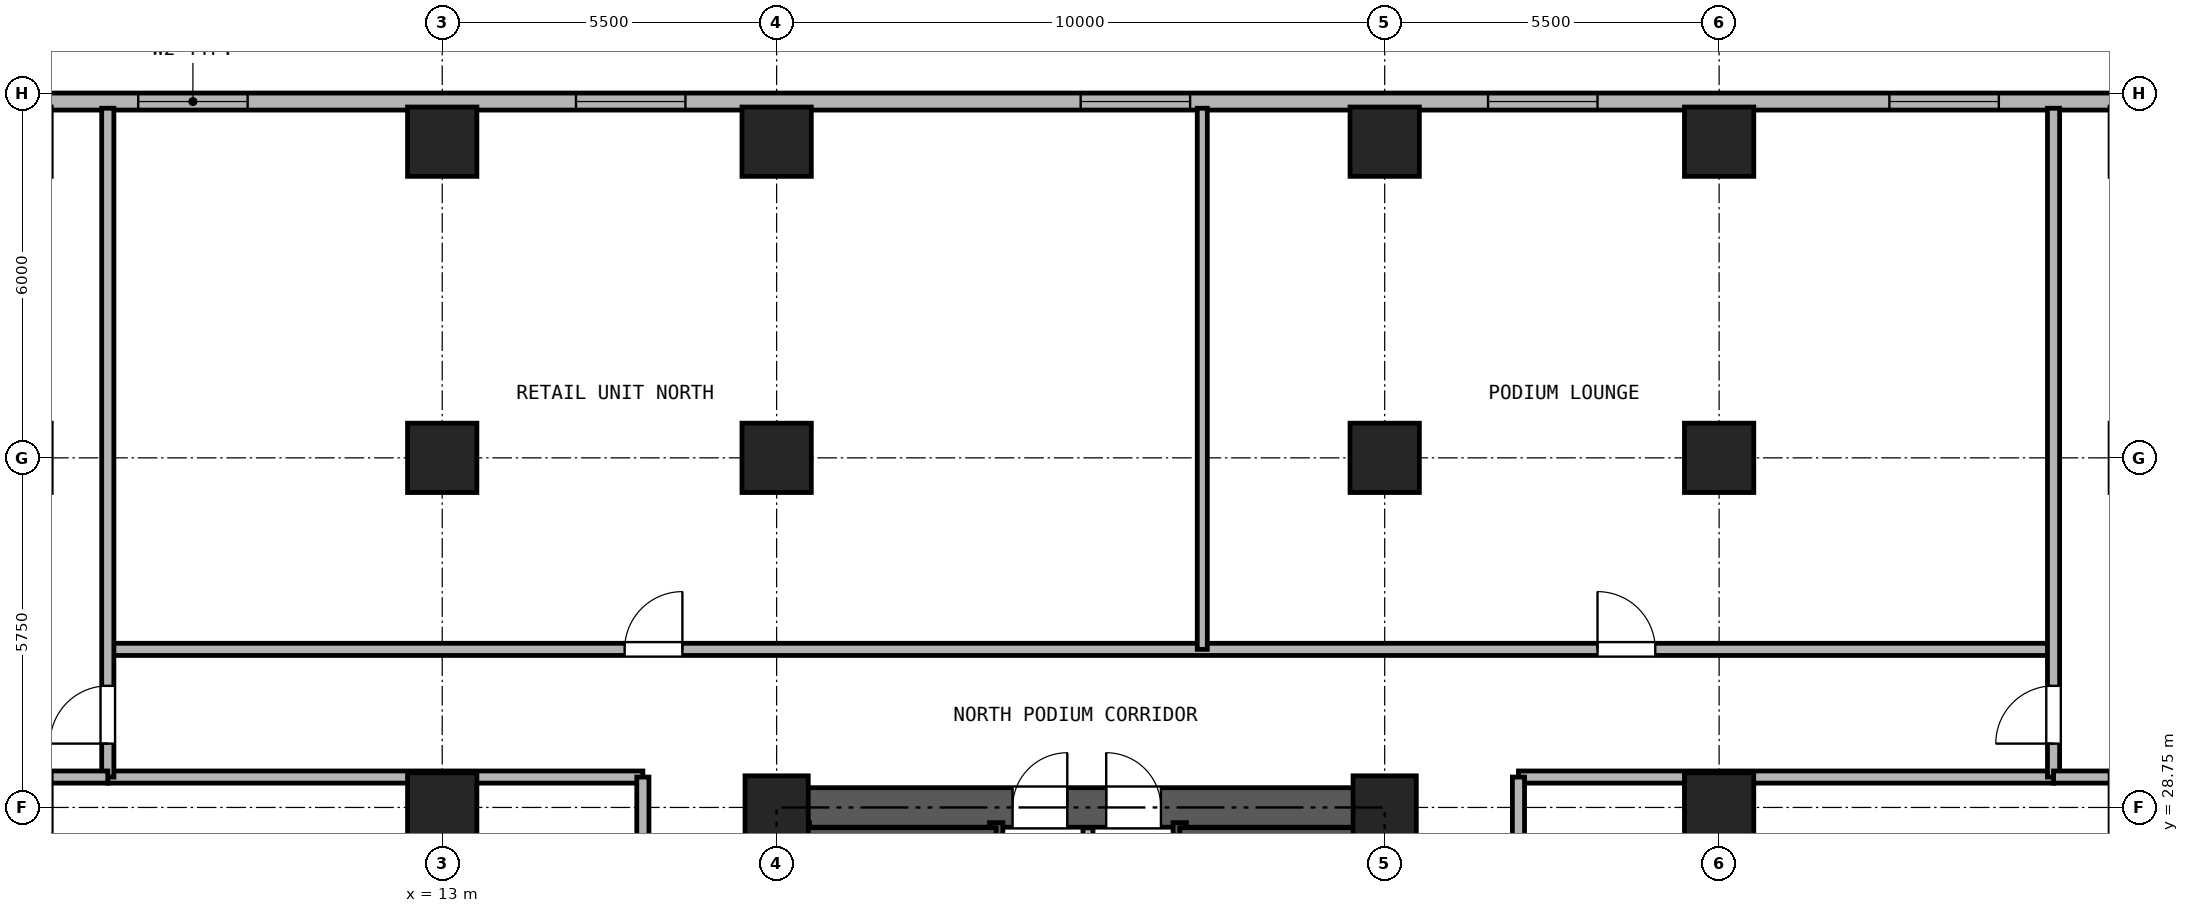
"""IFC4 building model, lengths in metres.
Left out: names, types, materials, properties, quantities, classifications, styles, units other than length and angle.
Written with IfcOpenShell. Run it as: python <this file> out.ifc"""

import sys

from ifc_helpers import new_model, si_unit, direction, frame, frame_2d, origin, origin_2d, place, context, subcontext, project, spatial, rectangle, hollow_rectangle, extrude, source, transform, mapped, element, fill, save


model = new_model("IFC4")
c1 = context("Model", 3, precision=1e-05, world=origin(), true_north=direction((0.0, 1.0)))
c2 = subcontext(c1, "Body", "Model", "MODEL_VIEW")
j1 = project(units=[si_unit("LENGTHUNIT", "METRE"), si_unit("PLANEANGLEUNIT", "RADIAN")], contexts=[c1])
p1 = place(None, origin())
s1 = spatial("IfcSite", under=j1, at=p1, CompositionType="ELEMENT")
p2 = place(p1, origin())
s2 = spatial("IfcBuilding", under=s1, at=p2, CompositionType="ELEMENT")
p3 = place(p2, frame((0.0, 0.0, 4.5)))
s3 = spatial("IfcBuildingStorey", under=s2, at=p3, CompositionType="ELEMENT", Elevation=4.5)
m1 = source(origin(), c2, "Body", "SweptSolid", [
    extrude(hollow_rectangle(XDim=1.14, YDim=1.14, WallThickness=0.07, at=origin_2d()), origin(), (0.0, 0.0, 1.0), 4.18),
])
for number, where, z_axis, x_axis in (
    (1, (13.0, 39.7, 0.0), (0.0, 0.0, 1.0), (1.0, 0.0, 0.0)),
    (2, (18.5, 39.7, 0.0), (0.0, 0.0, 1.0), (1.0, 0.0, 0.0)),
    (3, (28.5, 39.7, 0.0), (0.0, 0.0, 1.0), (1.0, 0.0, 0.0)),
    (4, (34.0, 39.7, 0.0), (0.0, 0.0, 1.0), (1.0, 0.0, 0.0)),
    (5, (13.0, 28.75, 0.0), (0.0, 0.0, 1.0), (1.0, 0.0, 0.0)),
    (6, (13.0, 34.5, 0.0), (0.0, 0.0, 1.0), (1.0, 0.0, 0.0)),
):
    element("IfcColumn", number, at=place(p3, frame(where, z_axis=z_axis, x_axis=x_axis)), inside=s3, PredefinedType="COLUMN", context=c2, shape_type="MappedRepresentation", body=[
        mapped(m1, transform((0.0, 0.0, 0.0), x_axis=(1.0, 0.0, 0.0), y_axis=(0.0, 1.0, 0.0), z_axis=(0.0, 0.0, 1.0), scale=1.0)),
    ])
m2 = source(origin(), c2, "Body", "SweptSolid", [
    extrude(hollow_rectangle(XDim=1.04, YDim=1.04, WallThickness=0.065, at=origin_2d()), origin(), (0.0, 0.0, 1.0), 4.18),
])
p4 = place(p3, frame((18.5, 28.75, 0.0), z_axis=(0.0, 0.0, 1.0), x_axis=(1.0, 0.0, 0.0)))
e7 = element("IfcColumn", 7, at=p4, inside=s3, PredefinedType="COLUMN", context=c2, shape_type="MappedRepresentation", body=[
    mapped(m2, transform((0.0, 0.0, 0.0), x_axis=(1.0, 0.0, 0.0), y_axis=(0.0, 1.0, 0.0), z_axis=(0.0, 0.0, 1.0), scale=1.0)),
])
p5 = place(p3, frame((18.5, 34.5, 0.0), z_axis=(0.0, 0.0, 1.0), x_axis=(1.0, 0.0, 0.0)))
e8 = element("IfcColumn", 8, at=p5, inside=s3, PredefinedType="COLUMN", context=c2, shape_type="MappedRepresentation", body=[
    mapped(m1, transform((0.0, 0.0, 0.0), x_axis=(1.0, 0.0, 0.0), y_axis=(0.0, 1.0, 0.0), z_axis=(0.0, 0.0, 1.0), scale=1.0)),
])
p6 = place(p3, frame((28.5, 28.75, 0.0), z_axis=(0.0, 0.0, 1.0), x_axis=(1.0, 0.0, 0.0)))
e9 = element("IfcColumn", 9, at=p6, inside=s3, PredefinedType="COLUMN", context=c2, shape_type="MappedRepresentation", body=[
    mapped(m2, transform((0.0, 0.0, 0.0), x_axis=(1.0, 0.0, 0.0), y_axis=(0.0, 1.0, 0.0), z_axis=(0.0, 0.0, 1.0), scale=1.0)),
])
for number, where, z_axis, x_axis in (
    (10, (28.5, 34.5, 0.0), (0.0, 0.0, 1.0), (1.0, 0.0, 0.0)),
    (11, (34.0, 28.75, 0.0), (0.0, 0.0, 1.0), (1.0, 0.0, 0.0)),
    (12, (34.0, 34.5, 0.0), (0.0, 0.0, 1.0), (1.0, 0.0, 0.0)),
):
    element("IfcColumn", number, at=place(p3, frame(where, z_axis=z_axis, x_axis=x_axis)), inside=s3, PredefinedType="COLUMN", context=c2, shape_type="MappedRepresentation", body=[
        mapped(m1, transform((0.0, 0.0, 0.0), x_axis=(1.0, 0.0, 0.0), y_axis=(0.0, 1.0, 0.0), z_axis=(0.0, 0.0, 1.0), scale=1.0)),
    ])
p7 = place(p3, frame((4.0, 40.36, 0.0), z_axis=(0.0, 0.0, 1.0), x_axis=(1.0, 0.0, 0.0)))
e13 = element("IfcWall", 13, at=p7, inside=s3, PredefinedType="SOLIDWALL", context=c2, shape_type="SweptSolid", body=[
    extrude(rectangle(XDim=39.0, YDim=0.28, at=frame_2d((19.5, 0.0))), origin(), (0.0, 0.0, 1.0), 4.18),
])
p8 = place(p7, frame((4.0, 0.0, 0.9)))
e14 = element("IfcOpeningElement", 14, at=p8, cuts=e13, PredefinedType="OPENING", context=c2, shape_type="SweptSolid", body=[
    extrude(rectangle(XDim=1.8, YDim=2.1, at=frame_2d((0.9, 1.05))), frame((0.0, 0.15, 0.0), z_axis=(0.0, -1.0, 0.0), x_axis=(1.0, 0.0, 0.0)), (0.0, 0.0, 1.0), 0.3),
])
p9 = place(p7, frame((11.2, 0.0, 0.9)))
e15 = element("IfcOpeningElement", 15, at=p9, cuts=e13, PredefinedType="OPENING", context=c2, shape_type="SweptSolid", body=[
    extrude(rectangle(XDim=1.8, YDim=2.1, at=frame_2d((0.9, 1.05))), frame((0.0, 0.15, 0.0), z_axis=(0.0, -1.0, 0.0), x_axis=(1.0, 0.0, 0.0)), (0.0, 0.0, 1.0), 0.3),
])
p10 = place(p7, frame((19.5, 0.0, 0.9)))
e16 = element("IfcOpeningElement", 16, at=p10, cuts=e13, PredefinedType="OPENING", context=c2, shape_type="SweptSolid", body=[
    extrude(rectangle(XDim=1.8, YDim=2.1, at=frame_2d((0.9, 1.05))), frame((0.0, 0.15, 0.0), z_axis=(0.0, -1.0, 0.0), x_axis=(1.0, 0.0, 0.0)), (0.0, 0.0, 1.0), 0.3),
])
p11 = place(p7, frame((26.2, 0.0, 0.9)))
e17 = element("IfcOpeningElement", 17, at=p11, cuts=e13, PredefinedType="OPENING", context=c2, shape_type="SweptSolid", body=[
    extrude(rectangle(XDim=1.8, YDim=2.1, at=frame_2d((0.9, 1.05))), frame((0.0, 0.15, 0.0), z_axis=(0.0, -1.0, 0.0), x_axis=(1.0, 0.0, 0.0)), (0.0, 0.0, 1.0), 0.3),
])
p12 = place(p7, frame((32.8, 0.0, 0.9)))
e18 = element("IfcOpeningElement", 18, at=p12, cuts=e13, PredefinedType="OPENING", context=c2, shape_type="SweptSolid", body=[
    extrude(rectangle(XDim=1.8, YDim=2.1, at=frame_2d((0.9, 1.05))), frame((0.0, 0.15, 0.0), z_axis=(0.0, -1.0, 0.0), x_axis=(1.0, 0.0, 0.0)), (0.0, 0.0, 1.0), 0.3),
])
p13 = place(p3, frame((18.175, 28.75, 0.0), z_axis=(0.0, 0.0, 1.0), x_axis=(1.0, 0.0, 0.0)))
e19 = element("IfcWall", 19, at=p13, inside=s3, PredefinedType="SHEAR", context=c2, shape_type="SweptSolid", body=[
    extrude(rectangle(XDim=10.65, YDim=0.65, at=frame_2d((5.325, 0.0))), origin(), (0.0, 0.0, 1.0), 4.18),
])
p14 = place(p13, frame((4.205, 0.0, 0.0)))
e20 = element("IfcOpeningElement", 20, at=p14, cuts=e19, PredefinedType="OPENING", context=c2, shape_type="SweptSolid", body=[
    extrude(rectangle(XDim=0.9, YDim=2.05, at=frame_2d((0.45, 1.025))), frame((0.0, 0.335, 0.0), z_axis=(0.0, -1.0, 0.0), x_axis=(1.0, 0.0, 0.0)), (0.0, 0.0, 1.0), 0.67),
])
p15 = place(p13, frame((5.745, 0.0, 0.0)))
e21 = element("IfcOpeningElement", 21, at=p15, cuts=e19, PredefinedType="OPENING", context=c2, shape_type="SweptSolid", body=[
    extrude(rectangle(XDim=0.9, YDim=2.05, at=frame_2d((0.45, 1.025))), frame((0.0, 0.335, 0.0), z_axis=(0.0, -1.0, 0.0), x_axis=(1.0, 0.0, 0.0)), (0.0, 0.0, 1.0), 0.67),
])
p16 = place(p3, frame((18.5, 11.825, 0.0), z_axis=(0.0, 0.0, 1.0), x_axis=(0.0, 1.0, 0.0)))
e22 = element("IfcWall", 22, at=p16, inside=s3, PredefinedType="SHEAR", context=c2, shape_type="SweptSolid", body=[
    extrude(rectangle(XDim=16.6, YDim=0.65, at=frame_2d((8.3, 0.0))), origin(), (0.0, 0.0, 1.0), 4.18),
])
p17 = place(p16, frame((7.325, 0.0, 0.0)))
e23 = element("IfcOpeningElement", 23, at=p17, cuts=e22, PredefinedType="OPENING", context=c2, shape_type="SweptSolid", body=[
    extrude(rectangle(XDim=1.15, YDim=2.2, at=frame_2d((0.575, 1.1))), frame((0.0, 0.335, 0.0), z_axis=(0.0, -1.0, 0.0), x_axis=(1.0, 0.0, 0.0)), (0.0, 0.0, 1.0), 0.67),
])
p18 = place(p3, frame((28.5, 11.825, 0.0), z_axis=(0.0, 0.0, 1.0), x_axis=(0.0, 1.0, 0.0)))
e24 = element("IfcWall", 24, at=p18, inside=s3, PredefinedType="SHEAR", context=c2, shape_type="SweptSolid", body=[
    extrude(rectangle(XDim=16.6, YDim=0.65, at=frame_2d((8.3, 0.0))), origin(), (0.0, 0.0, 1.0), 4.18),
])
p19 = place(p18, frame((7.325, 0.0, 0.0)))
e25 = element("IfcOpeningElement", 25, at=p19, cuts=e24, PredefinedType="OPENING", context=c2, shape_type="SweptSolid", body=[
    extrude(rectangle(XDim=1.15, YDim=2.2, at=frame_2d((0.575, 1.1))), frame((0.0, 0.335, 0.0), z_axis=(0.0, -1.0, 0.0), x_axis=(1.0, 0.0, 0.0)), (0.0, 0.0, 1.0), 0.67),
])
for number, where, z_axis, x_axis in (
    (26, (18.93, 21.39, 0.0), (0.0, 0.0, 1.0), (0.0, 1.0, 0.0)),
    (27, (22.11, 21.39, 0.0), (0.0, 0.0, 1.0), (0.0, 1.0, 0.0)),
    (28, (25.13, 21.39, 0.0), (0.0, 0.0, 1.0), (0.0, 1.0, 0.0)),
):
    element("IfcWall", number, at=place(p3, frame(where, z_axis=z_axis, x_axis=x_axis)), inside=s3, PredefinedType="SOLIDWALL", context=c2, shape_type="SweptSolid", body=[
        extrude(rectangle(XDim=7.11, YDim=0.22, at=frame_2d((3.555, 0.0))), origin(), (0.0, 0.0, 1.0), 4.18),
    ])
p20 = place(p3, frame((18.835, 28.335, 0.0), z_axis=(0.0, 0.0, 1.0), x_axis=(1.0, 0.0, 0.0)))
e29 = element("IfcWall", 29, at=p20, inside=s3, PredefinedType="PARTITIONING", context=c2, shape_type="SweptSolid", body=[
    extrude(rectangle(XDim=3.275, YDim=0.165, at=frame_2d((1.638, 0.0))), origin(), (0.0, 0.0, 1.0), 4.18),
])
p21 = place(p3, frame((25.13, 28.335, 0.0), z_axis=(0.0, 0.0, 1.0), x_axis=(1.0, 0.0, 0.0)))
e30 = element("IfcWall", 30, at=p21, inside=s3, PredefinedType="PARTITIONING", context=c2, shape_type="SweptSolid", body=[
    extrude(rectangle(XDim=3.035, YDim=0.165, at=frame_2d((1.518, 0.0))), origin(), (0.0, 0.0, 1.0), 4.18),
])
p22 = place(p3, frame((23.62, 24.4, 0.0), z_axis=(0.0, 0.0, 1.0), x_axis=(0.0, 1.0, 0.0)))
e31 = element("IfcWall", 31, at=p22, inside=s3, PredefinedType="PARTITIONING", context=c2, shape_type="SweptSolid", body=[
    extrude(rectangle(XDim=4.015, YDim=0.165, at=frame_2d((2.008, 0.0))), origin(), (0.0, 0.0, 1.0), 4.18),
])
p23 = place(p3, frame((7.5, 31.35, 0.0), z_axis=(0.0, 0.0, 1.0), x_axis=(1.0, 0.0, 0.0)))
e32 = element("IfcWall", 32, at=p23, inside=s3, PredefinedType="PARTITIONING", context=c2, shape_type="SweptSolid", body=[
    extrude(rectangle(XDim=32.0, YDim=0.2, at=frame_2d((16.0, 0.0))), origin(), (0.0, 0.0, 1.0), 4.18),
])
p24 = place(p23, frame((8.5, 0.0, 0.0)))
e33 = element("IfcOpeningElement", 33, at=p24, cuts=e32, PredefinedType="OPENING", context=c2, shape_type="SweptSolid", body=[
    extrude(rectangle(XDim=0.95, YDim=2.15, at=frame_2d((0.475, 1.075))), frame((0.0, 0.11, 0.0), z_axis=(0.0, -1.0, 0.0), x_axis=(1.0, 0.0, 0.0)), (0.0, 0.0, 1.0), 0.22),
])
p25 = place(p23, frame((24.5, 0.0, 0.0)))
e34 = element("IfcOpeningElement", 34, at=p25, cuts=e32, PredefinedType="OPENING", context=c2, shape_type="SweptSolid", body=[
    extrude(rectangle(XDim=0.95, YDim=2.15, at=frame_2d((0.475, 1.075))), frame((0.0, 0.11, 0.0), z_axis=(0.0, -1.0, 0.0), x_axis=(1.0, 0.0, 0.0)), (0.0, 0.0, 1.0), 0.22),
])
for number, where, z_axis, x_axis in (
    (35, (7.5, 29.25, 0.0), (0.0, 0.0, 1.0), (1.0, 0.0, 0.0)),
    (36, (30.7, 29.25, 0.0), (0.0, 0.0, 1.0), (1.0, 0.0, 0.0)),
):
    element("IfcWall", number, at=place(p3, frame(where, z_axis=z_axis, x_axis=x_axis)), inside=s3, PredefinedType="PARTITIONING", context=c2, shape_type="SweptSolid", body=[
        extrude(rectangle(XDim=8.8, YDim=0.2, at=frame_2d((4.4, 0.0))), origin(), (0.0, 0.0, 1.0), 4.18),
    ])
p26 = place(p3, frame((16.3, 11.0, 0.0), z_axis=(0.0, 0.0, 1.0), x_axis=(0.0, 1.0, 0.0)))
e37 = element("IfcWall", 37, at=p26, inside=s3, PredefinedType="PARTITIONING", context=c2, shape_type="SweptSolid", body=[
    extrude(rectangle(XDim=18.25, YDim=0.2, at=frame_2d((9.125, 0.0))), origin(), (0.0, 0.0, 1.0), 4.18),
])
p27 = place(p26, frame((4.25, 0.0, 0.0)))
e38 = element("IfcOpeningElement", 38, at=p27, cuts=e37, PredefinedType="OPENING", context=c2, shape_type="SweptSolid", body=[
    extrude(rectangle(XDim=0.95, YDim=2.15, at=frame_2d((0.475, 1.075))), frame((0.0, 0.11, 0.0), z_axis=(0.0, -1.0, 0.0), x_axis=(1.0, 0.0, 0.0)), (0.0, 0.0, 1.0), 0.22),
])
p28 = place(p26, frame((13.375, 0.0, 0.0)))
e39 = element("IfcOpeningElement", 39, at=p28, cuts=e37, PredefinedType="OPENING", context=c2, shape_type="SweptSolid", body=[
    extrude(rectangle(XDim=0.95, YDim=2.15, at=frame_2d((0.475, 1.075))), frame((0.0, 0.11, 0.0), z_axis=(0.0, -1.0, 0.0), x_axis=(1.0, 0.0, 0.0)), (0.0, 0.0, 1.0), 0.22),
])
p29 = place(p3, frame((30.7, 11.0, 0.0), z_axis=(0.0, 0.0, 1.0), x_axis=(0.0, 1.0, 0.0)))
e40 = element("IfcWall", 40, at=p29, inside=s3, PredefinedType="PARTITIONING", context=c2, shape_type="SweptSolid", body=[
    extrude(rectangle(XDim=18.25, YDim=0.2, at=frame_2d((9.125, 0.0))), origin(), (0.0, 0.0, 1.0), 4.18),
])
p30 = place(p29, frame((8.625, 0.0, 0.0)))
e41 = element("IfcOpeningElement", 41, at=p30, cuts=e40, PredefinedType="OPENING", context=c2, shape_type="SweptSolid", body=[
    extrude(rectangle(XDim=0.95, YDim=2.15, at=frame_2d((0.475, 1.075))), frame((0.0, 0.11, 0.0), z_axis=(0.0, -1.0, 0.0), x_axis=(1.0, 0.0, 0.0)), (0.0, 0.0, 1.0), 0.22),
])
p31 = place(p3, frame((7.5, 29.25, 0.0), z_axis=(0.0, 0.0, 1.0), x_axis=(0.0, 1.0, 0.0)))
e42 = element("IfcWall", 42, at=p31, inside=s3, PredefinedType="PARTITIONING", context=c2, shape_type="SweptSolid", body=[
    extrude(rectangle(XDim=11.0, YDim=0.2, at=frame_2d((5.5, 0.0))), origin(), (0.0, 0.0, 1.0), 4.18),
])
p32 = place(p31, frame((0.55, 0.0, 0.0)))
e43 = element("IfcOpeningElement", 43, at=p32, cuts=e42, PredefinedType="OPENING", context=c2, shape_type="SweptSolid", body=[
    extrude(rectangle(XDim=0.95, YDim=2.15, at=frame_2d((0.475, 1.075))), frame((0.0, 0.11, 0.0), z_axis=(0.0, -1.0, 0.0), x_axis=(1.0, 0.0, 0.0)), (0.0, 0.0, 1.0), 0.22),
])
p33 = place(p3, frame((39.5, 29.25, 0.0), z_axis=(0.0, 0.0, 1.0), x_axis=(0.0, 1.0, 0.0)))
e44 = element("IfcWall", 44, at=p33, inside=s3, PredefinedType="PARTITIONING", context=c2, shape_type="SweptSolid", body=[
    extrude(rectangle(XDim=11.0, YDim=0.2, at=frame_2d((5.5, 0.0))), origin(), (0.0, 0.0, 1.0), 4.18),
])
p34 = place(p33, frame((0.55, 0.0, 0.0)))
e45 = element("IfcOpeningElement", 45, at=p34, cuts=e44, PredefinedType="OPENING", context=c2, shape_type="SweptSolid", body=[
    extrude(rectangle(XDim=0.95, YDim=2.15, at=frame_2d((0.475, 1.075))), frame((0.0, 0.11, 0.0), z_axis=(0.0, -1.0, 0.0), x_axis=(1.0, 0.0, 0.0)), (0.0, 0.0, 1.0), 0.22),
])
for number, where, z_axis, x_axis in (
    (46, (0.25, 29.25, 0.0), (0.0, 0.0, 1.0), (1.0, 0.0, 0.0)),
    (47, (39.5, 29.25, 0.0), (0.0, 0.0, 1.0), (1.0, 0.0, 0.0)),
):
    element("IfcWall", number, at=place(p3, frame(where, z_axis=z_axis, x_axis=x_axis)), inside=s3, PredefinedType="PARTITIONING", context=c2, shape_type="SweptSolid", body=[
        extrude(rectangle(XDim=7.25, YDim=0.2, at=frame_2d((3.625, 0.0))), origin(), (0.0, 0.0, 1.0), 4.18),
    ])
p35 = place(p3, frame((25.5, 31.35, 0.0), z_axis=(0.0, 0.0, 1.0), x_axis=(0.0, 1.0, 0.0)))
e48 = element("IfcWall", 48, at=p35, inside=s3, PredefinedType="PARTITIONING", context=c2, shape_type="SweptSolid", body=[
    extrude(rectangle(XDim=8.9, YDim=0.165, at=frame_2d((4.45, 0.0))), origin(), (0.0, 0.0, 1.0), 4.18),
])
p36 = place(p8, origin())
e49 = element("IfcWindow", 49, at=p36, inside=s3, PartitioningType="SINGLE_PANEL", PredefinedType="WINDOW", context=c2, shape_type="SweptSolid", body=[
    extrude(rectangle(XDim=1.8, YDim=2.1, at=frame_2d((0.9, 1.05))), frame((0.0, 0.03, 0.0), z_axis=(0.0, -1.0, 0.0), x_axis=(1.0, 0.0, 0.0)), (0.0, 0.0, 1.0), 0.06),
])
fill(e14, e49)
p37 = place(p9, origin())
e50 = element("IfcWindow", 50, at=p37, inside=s3, PartitioningType="SINGLE_PANEL", PredefinedType="WINDOW", context=c2, shape_type="SweptSolid", body=[
    extrude(rectangle(XDim=1.8, YDim=2.1, at=frame_2d((0.9, 1.05))), frame((0.0, 0.03, 0.0), z_axis=(0.0, -1.0, 0.0), x_axis=(1.0, 0.0, 0.0)), (0.0, 0.0, 1.0), 0.06),
])
fill(e15, e50)
p38 = place(p10, origin())
e51 = element("IfcWindow", 51, at=p38, inside=s3, PartitioningType="SINGLE_PANEL", PredefinedType="WINDOW", context=c2, shape_type="SweptSolid", body=[
    extrude(rectangle(XDim=1.8, YDim=2.1, at=frame_2d((0.9, 1.05))), frame((0.0, 0.03, 0.0), z_axis=(0.0, -1.0, 0.0), x_axis=(1.0, 0.0, 0.0)), (0.0, 0.0, 1.0), 0.06),
])
fill(e16, e51)
p39 = place(p11, origin())
e52 = element("IfcWindow", 52, at=p39, inside=s3, PartitioningType="SINGLE_PANEL", PredefinedType="WINDOW", context=c2, shape_type="SweptSolid", body=[
    extrude(rectangle(XDim=1.8, YDim=2.1, at=frame_2d((0.9, 1.05))), frame((0.0, 0.03, 0.0), z_axis=(0.0, -1.0, 0.0), x_axis=(1.0, 0.0, 0.0)), (0.0, 0.0, 1.0), 0.06),
])
fill(e17, e52)
p40 = place(p12, origin())
e53 = element("IfcWindow", 53, at=p40, inside=s3, PartitioningType="SINGLE_PANEL", PredefinedType="WINDOW", context=c2, shape_type="SweptSolid", body=[
    extrude(rectangle(XDim=1.8, YDim=2.1, at=frame_2d((0.9, 1.05))), frame((0.0, 0.03, 0.0), z_axis=(0.0, -1.0, 0.0), x_axis=(1.0, 0.0, 0.0)), (0.0, 0.0, 1.0), 0.06),
])
fill(e18, e53)
p41 = place(p14, origin())
e54 = element("IfcDoor", 54, at=p41, inside=s3, OperationType="SINGLE_SWING_RIGHT", PredefinedType="DOOR", context=c2, shape_type="SweptSolid", body=[
    extrude(rectangle(XDim=0.9, YDim=2.05, at=frame_2d((0.45, 1.025))), frame((0.0, 0.025, 0.0), z_axis=(0.0, -1.0, 0.0), x_axis=(1.0, 0.0, 0.0)), (0.0, 0.0, 1.0), 0.05),
])
fill(e20, e54)
p42 = place(p15, origin())
e55 = element("IfcDoor", 55, at=p42, inside=s3, OperationType="SINGLE_SWING_LEFT", PredefinedType="DOOR", context=c2, shape_type="SweptSolid", body=[
    extrude(rectangle(XDim=0.9, YDim=2.05, at=frame_2d((0.45, 1.025))), frame((0.0, 0.025, 0.0), z_axis=(0.0, -1.0, 0.0), x_axis=(1.0, 0.0, 0.0)), (0.0, 0.0, 1.0), 0.05),
])
fill(e21, e55)
p43 = place(p24, origin())
e56 = element("IfcDoor", 56, at=p43, inside=s3, OperationType="SINGLE_SWING_RIGHT", PredefinedType="DOOR", context=c2, shape_type="SweptSolid", body=[
    extrude(rectangle(XDim=0.95, YDim=2.15, at=frame_2d((0.475, 1.075))), frame((0.0, 0.025, 0.0), z_axis=(0.0, -1.0, 0.0), x_axis=(1.0, 0.0, 0.0)), (0.0, 0.0, 1.0), 0.05),
])
fill(e33, e56)
p44 = place(p25, origin())
e57 = element("IfcDoor", 57, at=p44, inside=s3, OperationType="SINGLE_SWING_LEFT", PredefinedType="DOOR", context=c2, shape_type="SweptSolid", body=[
    extrude(rectangle(XDim=0.95, YDim=2.15, at=frame_2d((0.475, 1.075))), frame((0.0, 0.025, 0.0), z_axis=(0.0, -1.0, 0.0), x_axis=(1.0, 0.0, 0.0)), (0.0, 0.0, 1.0), 0.05),
])
fill(e34, e57)
p45 = place(p32, frame((0.95, 0.0, 0.0), z_axis=(0.0, 0.0, 1.0), x_axis=(-1.0, 0.0, 0.0)))
e58 = element("IfcDoor", 58, at=p45, inside=s3, OperationType="SINGLE_SWING_LEFT", PredefinedType="DOOR", context=c2, shape_type="SweptSolid", body=[
    extrude(rectangle(XDim=0.95, YDim=2.15, at=frame_2d((0.475, 1.075))), frame((0.0, 0.025, 0.0), z_axis=(0.0, -1.0, 0.0), x_axis=(1.0, 0.0, 0.0)), (0.0, 0.0, 1.0), 0.05),
])
fill(e43, e58)
p46 = place(p34, origin())
e59 = element("IfcDoor", 59, at=p46, inside=s3, OperationType="SINGLE_SWING_LEFT", PredefinedType="DOOR", context=c2, shape_type="SweptSolid", body=[
    extrude(rectangle(XDim=0.95, YDim=2.15, at=frame_2d((0.475, 1.075))), frame((0.0, 0.025, 0.0), z_axis=(0.0, -1.0, 0.0), x_axis=(1.0, 0.0, 0.0)), (0.0, 0.0, 1.0), 0.05),
])
fill(e45, e59)
save(model, sys.argv[1])
